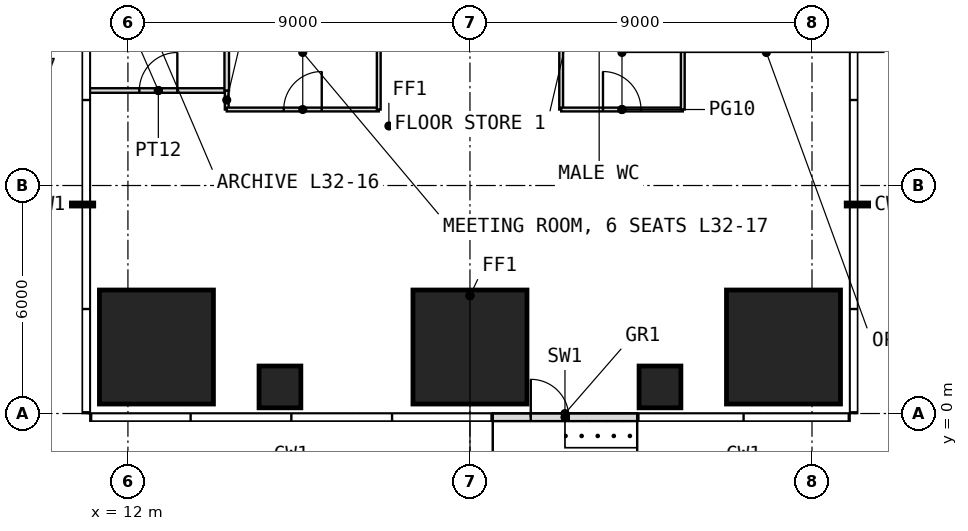
"""IFC4 building model, lengths in metres.
Left out: names, types, materials, properties, quantities, classifications, styles, units other than length and angle.
Written with IfcOpenShell. Run it as: python <this file> out.ifc"""

import sys

from ifc_helpers import new_model, si_unit, direction, frame, frame_2d, origin, origin_2d, place, context, subcontext, project, spatial, rectangle, extrude, element, fill, save


model = new_model("IFC4")
c1 = context("Model", 3, precision=1e-05, world=origin(), true_north=direction((0.0, 1.0)))
c2 = subcontext(c1, "Body", "Model", "MODEL_VIEW")
j1 = project(units=[si_unit("LENGTHUNIT", "METRE"), si_unit("PLANEANGLEUNIT", "RADIAN")], contexts=[c1])
p1 = place(None, origin())
s1 = spatial("IfcSite", under=j1, at=p1, CompositionType="ELEMENT")
p2 = place(p1, origin())
s2 = spatial("IfcBuilding", under=s1, at=p2, CompositionType="ELEMENT")
p3 = place(p2, frame((0.0, 0.0, 136.5)))
s3 = spatial("IfcBuildingStorey", under=s2, at=p3, CompositionType="ELEMENT", Elevation=136.5)
p4 = place(p3, frame((12.75, 1.75, 0.0), z_axis=(0.0, 0.0, 1.0), x_axis=(1.0, 0.0, 0.0)))
e1 = element("IfcColumn", 1, at=p4, inside=s3, PredefinedType="COLUMN", context=c2, shape_type="SweptSolid", body=[
    extrude(rectangle(XDim=3.0, YDim=3.0, at=origin_2d()), origin(), (0.0, 0.0, 1.0), 4.0),
])
p5 = place(p3, frame((16.0, 0.7, 0.0), z_axis=(0.0, 0.0, 1.0), x_axis=(1.0, 0.0, 0.0)))
e2 = element("IfcColumn", 2, at=p5, inside=s3, PredefinedType="COLUMN", context=c2, shape_type="SweptSolid", body=[
    extrude(rectangle(XDim=1.1, YDim=1.1, at=origin_2d()), origin(), (0.0, 0.0, 1.0), 4.0),
])
p6 = place(p3, frame((21.0, 1.75, 0.0), z_axis=(0.0, 0.0, 1.0), x_axis=(1.0, 0.0, 0.0)))
e3 = element("IfcColumn", 3, at=p6, inside=s3, PredefinedType="COLUMN", context=c2, shape_type="SweptSolid", body=[
    extrude(rectangle(XDim=3.0, YDim=3.0, at=origin_2d()), origin(), (0.0, 0.0, 1.0), 4.0),
])
p7 = place(p3, frame((26.0, 0.7, 0.0), z_axis=(0.0, 0.0, 1.0), x_axis=(1.0, 0.0, 0.0)))
e4 = element("IfcColumn", 4, at=p7, inside=s3, PredefinedType="COLUMN", context=c2, shape_type="SweptSolid", body=[
    extrude(rectangle(XDim=1.1, YDim=1.1, at=origin_2d()), origin(), (0.0, 0.0, 1.0), 4.0),
])
p8 = place(p3, frame((29.25, 1.75, 0.0), z_axis=(0.0, 0.0, 1.0), x_axis=(1.0, 0.0, 0.0)))
e5 = element("IfcColumn", 5, at=p8, inside=s3, PredefinedType="COLUMN", context=c2, shape_type="SweptSolid", body=[
    extrude(rectangle(XDim=3.0, YDim=3.0, at=origin_2d()), origin(), (0.0, 0.0, 1.0), 4.0),
])
p9 = place(p3, frame((21.6, -0.1, 0.0), z_axis=(0.0, 0.0, 1.0), x_axis=(1.0, 0.0, 0.0)))
e6 = element("IfcWall", 6, at=p9, inside=s3, PredefinedType="USERDEFINED", context=c2, shape_type="SweptSolid", body=[
    extrude(rectangle(XDim=3.8, YDim=0.2, at=frame_2d((1.9, 0.0))), origin(), (0.0, 0.0, 1.0), 3.75),
])
p10 = place(p9, frame((1.0, 0.0, 0.0)))
e7 = element("IfcOpeningElement", 7, at=p10, cuts=e6, PredefinedType="OPENING", context=c2, shape_type="SweptSolid", body=[
    extrude(rectangle(XDim=1.0, YDim=2.4, at=frame_2d((0.5, 1.2))), frame((0.0, 0.11, 0.0), z_axis=(0.0, -1.0, 0.0), x_axis=(1.0, 0.0, 0.0)), (0.0, 0.0, 1.0), 0.22),
])
p11 = place(p3, frame((11.0, 8.5, 0.0), z_axis=(0.0, 0.0, 1.0), x_axis=(1.0, 0.0, 0.0)))
e8 = element("IfcWall", 8, at=p11, inside=s3, PredefinedType="PARTITIONING", context=c2, shape_type="SweptSolid", body=[
    extrude(rectangle(XDim=3.6, YDim=0.12, at=frame_2d((1.8, 0.0))), origin(), (0.0, 0.0, 1.0), 3.75),
])
p12 = place(p11, frame((1.3, 0.0, 0.0)))
e9 = element("IfcOpeningElement", 9, at=p12, cuts=e8, PredefinedType="OPENING", context=c2, shape_type="SweptSolid", body=[
    extrude(rectangle(XDim=1.0, YDim=2.2, at=frame_2d((0.5, 1.1))), frame((0.0, 0.07, 0.0), z_axis=(0.0, -1.0, 0.0), x_axis=(1.0, 0.0, 0.0)), (0.0, 0.0, 1.0), 0.14),
])
p13 = place(p3, frame((14.6, 8.0, 0.0), z_axis=(0.0, 0.0, 1.0), x_axis=(0.0, 1.0, 0.0)))
e10 = element("IfcWall", 10, at=p13, inside=s3, PredefinedType="PARTITIONING", context=c2, shape_type="SweptSolid", body=[
    extrude(rectangle(XDim=0.5, YDim=0.1, at=frame_2d((0.25, 0.0))), origin(), (0.0, 0.0, 1.0), 3.75),
])
p14 = place(p3, frame((14.6, 8.0, 0.0), z_axis=(0.0, 0.0, 1.0), x_axis=(1.0, 0.0, 0.0)))
e11 = element("IfcWall", 11, at=p14, inside=s3, PredefinedType="PARTITIONING", context=c2, shape_type="SweptSolid", body=[
    extrude(rectangle(XDim=4.0, YDim=0.1, at=frame_2d((2.0, 0.0))), origin(), (0.0, 0.0, 1.0), 3.75),
])
p15 = place(p14, frame((1.5, 0.0, 0.0)))
e12 = element("IfcOpeningElement", 12, at=p15, cuts=e11, PredefinedType="OPENING", context=c2, shape_type="SweptSolid", body=[
    extrude(rectangle(XDim=1.0, YDim=2.4, at=frame_2d((0.5, 1.2))), frame((0.0, 0.06, 0.0), z_axis=(0.0, -1.0, 0.0), x_axis=(1.0, 0.0, 0.0)), (0.0, 0.0, 1.0), 0.12),
])
p16 = place(p3, frame((14.6, 8.5, 0.0), z_axis=(0.0, 0.0, 1.0), x_axis=(0.0, 1.0, 0.0)))
e13 = element("IfcWall", 13, at=p16, inside=s3, PredefinedType="PARTITIONING", context=c2, shape_type="SweptSolid", body=[
    extrude(rectangle(XDim=2.45, YDim=0.12, at=frame_2d((1.225, 0.0))), origin(), (0.0, 0.0, 1.0), 3.75),
])
for number, where, z_axis, x_axis in (
    (14, (18.6, 8.0, 0.0), (0.0, 0.0, 1.0), (0.0, 1.0, 0.0)),
    (15, (23.4, 8.0, 0.0), (0.0, 0.0, 1.0), (0.0, 1.0, 0.0)),
):
    element("IfcWall", number, at=place(p3, frame(where, z_axis=z_axis, x_axis=x_axis)), inside=s3, PredefinedType="PARTITIONING", context=c2, shape_type="SweptSolid", body=[
        extrude(rectangle(XDim=2.95, YDim=0.1, at=frame_2d((1.475, 0.0))), origin(), (0.0, 0.0, 1.0), 3.75),
    ])
p17 = place(p3, frame((23.4, 8.0, 0.0), z_axis=(0.0, 0.0, 1.0), x_axis=(1.0, 0.0, 0.0)))
e16 = element("IfcWall", 16, at=p17, inside=s3, PredefinedType="PARTITIONING", context=c2, shape_type="SweptSolid", body=[
    extrude(rectangle(XDim=3.2, YDim=0.1, at=frame_2d((1.6, 0.0))), origin(), (0.0, 0.0, 1.0), 3.75),
])
p18 = place(p17, frame((1.1, 0.0, 0.0)))
e17 = element("IfcOpeningElement", 17, at=p18, cuts=e16, PredefinedType="OPENING", context=c2, shape_type="SweptSolid", body=[
    extrude(rectangle(XDim=1.0, YDim=2.4, at=frame_2d((0.5, 1.2))), frame((0.0, 0.06, 0.0), z_axis=(0.0, -1.0, 0.0), x_axis=(1.0, 0.0, 0.0)), (0.0, 0.0, 1.0), 0.12),
])
p19 = place(p3, frame((26.6, 8.0, 0.0), z_axis=(0.0, 0.0, 1.0), x_axis=(0.0, 1.0, 0.0)))
e18 = element("IfcWall", 18, at=p19, inside=s3, PredefinedType="PARTITIONING", context=c2, shape_type="SweptSolid", body=[
    extrude(rectangle(XDim=2.95, YDim=0.1, at=frame_2d((1.475, 0.0))), origin(), (0.0, 0.0, 1.0), 3.75),
])
p20 = place(p10, origin())
e19 = element("IfcDoor", 19, at=p20, inside=s3, OperationType="SINGLE_SWING_LEFT", PredefinedType="DOOR", context=c2, shape_type="SweptSolid", body=[
    extrude(rectangle(XDim=1.0, YDim=2.4, at=frame_2d((0.5, 1.2))), frame((0.0, 0.025, 0.0), z_axis=(0.0, -1.0, 0.0), x_axis=(1.0, 0.0, 0.0)), (0.0, 0.0, 1.0), 0.05),
])
fill(e7, e19)
p21 = place(p12, origin())
e20 = element("IfcDoor", 20, at=p21, inside=s3, OperationType="SINGLE_SWING_RIGHT", PredefinedType="DOOR", context=c2, shape_type="SweptSolid", body=[
    extrude(rectangle(XDim=1.0, YDim=2.2, at=frame_2d((0.5, 1.1))), frame((0.0, 0.025, 0.0), z_axis=(0.0, -1.0, 0.0), x_axis=(1.0, 0.0, 0.0)), (0.0, 0.0, 1.0), 0.05),
])
fill(e9, e20)
p22 = place(p15, origin())
e21 = element("IfcDoor", 21, at=p22, inside=s3, OperationType="SINGLE_SWING_RIGHT", PredefinedType="DOOR", context=c2, shape_type="SweptSolid", body=[
    extrude(rectangle(XDim=1.0, YDim=2.4, at=frame_2d((0.5, 1.2))), frame((0.0, 0.025, 0.0), z_axis=(0.0, -1.0, 0.0), x_axis=(1.0, 0.0, 0.0)), (0.0, 0.0, 1.0), 0.05),
])
fill(e12, e21)
p23 = place(p18, origin())
e22 = element("IfcDoor", 22, at=p23, inside=s3, OperationType="SINGLE_SWING_LEFT", PredefinedType="DOOR", context=c2, shape_type="SweptSolid", body=[
    extrude(rectangle(XDim=1.0, YDim=2.4, at=frame_2d((0.5, 1.2))), frame((0.0, 0.025, 0.0), z_axis=(0.0, -1.0, 0.0), x_axis=(1.0, 0.0, 0.0)), (0.0, 0.0, 1.0), 0.05),
])
fill(e17, e22)
save(model, sys.argv[1])
